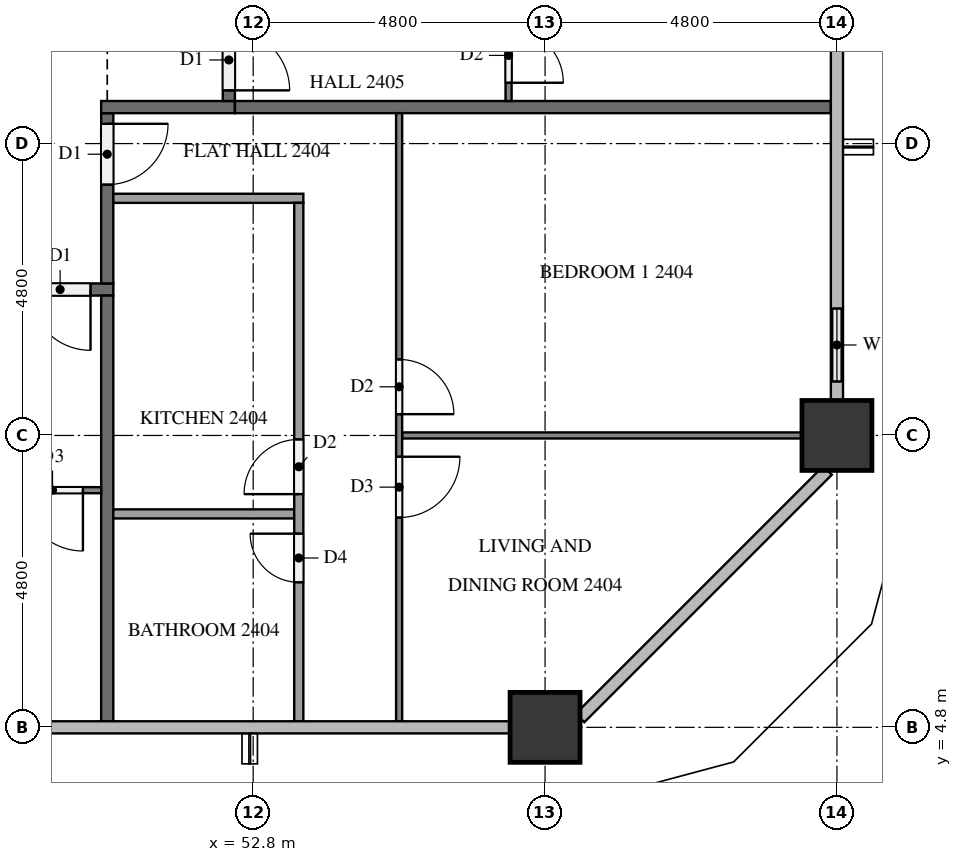
"""IFC4 building model, lengths in metres.
Left out: names, types, materials, properties, quantities, classifications, styles, units other than length and angle.
Written with IfcOpenShell. Run it as: python <this file> out.ifc"""

import sys

from ifc_helpers import new_model, si_unit, direction, frame, frame_2d, origin, origin_2d, place, context, subcontext, project, spatial, rectangle, extrude, element, fill, save


model = new_model("IFC4")
c1 = context("Model", 3, precision=1e-05, world=origin(), true_north=direction((0.0, 1.0)))
c2 = subcontext(c1, "Body", "Model", "MODEL_VIEW")
j1 = project(units=[si_unit("LENGTHUNIT", "METRE"), si_unit("PLANEANGLEUNIT", "RADIAN")], contexts=[c1])
p1 = place(None, origin())
s1 = spatial("IfcSite", under=j1, at=p1, CompositionType="ELEMENT")
p2 = place(p1, origin())
s2 = spatial("IfcBuilding", under=s1, at=p2, CompositionType="ELEMENT")
p3 = place(p2, frame((0.0, 0.0, 96.2)))
s3 = spatial("IfcBuildingStorey", under=s2, at=p3, CompositionType="ELEMENT", Elevation=96.2)
for number, where, z_axis, x_axis in (
    (1, (57.6, 4.8, 0.0), (0.0, 0.0, 1.0), (1.0, 0.0, 0.0)),
    (2, (62.4, 9.6, 0.0), (0.0, 0.0, 1.0), (1.0, 0.0, 0.0)),
):
    element("IfcColumn", number, at=place(p3, frame(where, z_axis=z_axis, x_axis=x_axis)), inside=s3, PredefinedType="COLUMN", context=c2, shape_type="SweptSolid", body=[
        extrude(rectangle(XDim=1.15, YDim=1.15, at=origin_2d()), origin(), (0.0, 0.0, 1.0), 3.2),
    ])
p4 = place(p3, frame((62.4, 10.175, 0.0), z_axis=(0.0, 0.0, 1.0), x_axis=(0.0, 1.0, 0.0)))
e3 = element("IfcWall", 3, at=p4, inside=s3, PredefinedType="SOLIDWALL", context=c2, shape_type="SweptSolid", body=[
    extrude(rectangle(XDim=1.825, YDim=0.15, at=frame_2d((0.913, 0.0))), origin(), (0.0, 0.0, 1.0), 3.2),
])
p5 = place(p4, frame((0.312, 0.0, 0.9)))
e4 = element("IfcOpeningElement", 4, at=p5, cuts=e3, PredefinedType="OPENING", context=c2, shape_type="SweptSolid", body=[
    extrude(rectangle(XDim=1.2, YDim=1.4, at=frame_2d((0.6, 0.7))), frame((0.0, 0.085, 0.0), z_axis=(0.0, -1.0, 0.0), x_axis=(1.0, 0.0, 0.0)), (0.0, 0.0, 1.0), 0.17),
])
p6 = place(p3, frame((50.5, 12.0, 0.0), z_axis=(0.0, 0.0, 1.0), x_axis=(-1.0, 0.0, 0.0)))
e5 = element("IfcWall", 5, at=p6, inside=s3, PredefinedType="PARTITIONING", context=c2, shape_type="SweptSolid", body=[
    extrude(rectangle(XDim=38.6, YDim=0.2, at=frame_2d((19.3, 0.0))), origin(), (0.0, 0.0, 1.0), 3.2),
])
p7 = place(p6, frame((21.975, 0.0, 0.0)))
e6 = element("IfcOpeningElement", 6, at=p7, cuts=e5, PredefinedType="OPENING", context=c2, shape_type="SweptSolid", body=[
    extrude(rectangle(XDim=1.0, YDim=2.1, at=frame_2d((0.5, 1.05))), frame((0.0, 0.11, 0.0), z_axis=(0.0, -1.0, 0.0), x_axis=(1.0, 0.0, 0.0)), (0.0, 0.0, 1.0), 0.22),
])
p8 = place(p6, frame((7.575, 0.0, 0.0)))
e7 = element("IfcOpeningElement", 7, at=p8, cuts=e5, PredefinedType="OPENING", context=c2, shape_type="SweptSolid", body=[
    extrude(rectangle(XDim=1.0, YDim=2.1, at=frame_2d((0.5, 1.05))), frame((0.0, 0.11, 0.0), z_axis=(0.0, -1.0, 0.0), x_axis=(1.0, 0.0, 0.0)), (0.0, 0.0, 1.0), 0.22),
])
p9 = place(p6, frame((0.375, 0.0, 0.0)))
e8 = element("IfcOpeningElement", 8, at=p9, cuts=e5, PredefinedType="OPENING", context=c2, shape_type="SweptSolid", body=[
    extrude(rectangle(XDim=1.0, YDim=2.1, at=frame_2d((0.5, 1.05))), frame((0.0, 0.11, 0.0), z_axis=(0.0, -1.0, 0.0), x_axis=(1.0, 0.0, 0.0)), (0.0, 0.0, 1.0), 0.22),
])
p10 = place(p3, frame((50.4, 14.9, 0.0), z_axis=(0.0, 0.0, 1.0), x_axis=(0.0, -1.0, 0.0)))
e9 = element("IfcWall", 9, at=p10, inside=s3, PredefinedType="PARTITIONING", context=c2, shape_type="SweptSolid", body=[
    extrude(rectangle(XDim=2.8, YDim=0.2, at=frame_2d((1.4, 0.0))), origin(), (0.0, 0.0, 1.0), 3.2),
])
p11 = place(p10, frame((0.175, 0.0, 0.0)))
e10 = element("IfcOpeningElement", 10, at=p11, cuts=e9, PredefinedType="OPENING", context=c2, shape_type="SweptSolid", body=[
    extrude(rectangle(XDim=1.0, YDim=2.1, at=frame_2d((0.5, 1.05))), frame((0.0, 0.11, 0.0), z_axis=(0.0, -1.0, 0.0), x_axis=(1.0, 0.0, 0.0)), (0.0, 0.0, 1.0), 0.22),
])
p12 = place(p3, frame((50.3, 15.0, 0.0), z_axis=(0.0, 0.0, 1.0), x_axis=(1.0, 0.0, 0.0)))
e11 = element("IfcWall", 11, at=p12, inside=s3, PredefinedType="PARTITIONING", context=c2, shape_type="SweptSolid", body=[
    extrude(rectangle(XDim=2.2, YDim=0.2, at=frame_2d((1.1, 0.0))), origin(), (0.0, 0.0, 1.0), 3.2),
])
p13 = place(p3, frame((52.4, 37.7, 0.0), z_axis=(0.0, 0.0, 1.0), x_axis=(0.0, -1.0, 0.0)))
e12 = element("IfcWall", 12, at=p13, inside=s3, PredefinedType="PARTITIONING", context=c2, shape_type="SweptSolid", body=[
    extrude(rectangle(XDim=22.6, YDim=0.2, at=frame_2d((11.3, 0.0))), origin(), (0.0, 0.0, 1.0), 3.2),
])
p14 = place(p13, frame((21.425, 0.0, 0.0)))
e13 = element("IfcOpeningElement", 13, at=p14, cuts=e12, PredefinedType="OPENING", context=c2, shape_type="SweptSolid", body=[
    extrude(rectangle(XDim=1.0, YDim=2.1, at=frame_2d((0.5, 1.05))), frame((0.0, 0.11, 0.0), z_axis=(0.0, -1.0, 0.0), x_axis=(1.0, 0.0, 0.0)), (0.0, 0.0, 1.0), 0.22),
])
p15 = place(p13, frame((0.175, 0.0, 0.0)))
e14 = element("IfcOpeningElement", 14, at=p15, cuts=e12, PredefinedType="OPENING", context=c2, shape_type="SweptSolid", body=[
    extrude(rectangle(XDim=1.0, YDim=2.1, at=frame_2d((0.5, 1.05))), frame((0.0, 0.11, 0.0), z_axis=(0.0, -1.0, 0.0), x_axis=(1.0, 0.0, 0.0)), (0.0, 0.0, 1.0), 0.22),
])
p16 = place(p3, frame((50.4, 11.9, 0.0), z_axis=(0.0, 0.0, 1.0), x_axis=(0.0, -1.0, 0.0)))
e15 = element("IfcWall", 15, at=p16, inside=s3, PredefinedType="PARTITIONING", context=c2, shape_type="SweptSolid", body=[
    extrude(rectangle(XDim=7.0, YDim=0.2, at=frame_2d((3.5, 0.0))), origin(), (0.0, 0.0, 1.0), 3.2),
])
p17 = place(p3, frame((52.5, 15.0, 0.0), z_axis=(0.0, 0.0, 1.0), x_axis=(1.0, 0.0, 0.0)))
e16 = element("IfcWall", 16, at=p17, inside=s3, PredefinedType="PARTITIONING", context=c2, shape_type="SweptSolid", body=[
    extrude(rectangle(XDim=9.8, YDim=0.2, at=frame_2d((4.9, 0.0))), origin(), (0.0, 0.0, 1.0), 3.2),
])
p18 = place(p3, frame((50.3, 8.7, 0.0), z_axis=(0.0, 0.0, 1.0), x_axis=(-1.0, 0.0, 0.0)))
e17 = element("IfcWall", 17, at=p18, inside=s3, PredefinedType="PARTITIONING", context=c2, shape_type="SweptSolid", body=[
    extrude(rectangle(XDim=7.0, YDim=0.1, at=frame_2d((3.5, 0.0))), origin(), (0.0, 0.0, 1.0), 3.2),
])
p19 = place(p18, frame((0.3, 0.0, 0.0)))
e18 = element("IfcOpeningElement", 18, at=p19, cuts=e17, PredefinedType="OPENING", context=c2, shape_type="SweptSolid", body=[
    extrude(rectangle(XDim=1.0, YDim=2.1, at=frame_2d((0.5, 1.05))), frame((0.0, 0.06, 0.0), z_axis=(0.0, -1.0, 0.0), x_axis=(1.0, 0.0, 0.0)), (0.0, 0.0, 1.0), 0.12),
])
p20 = place(p3, frame((55.25, 9.6, 0.0), z_axis=(0.0, 0.0, 1.0), x_axis=(1.0, 0.0, 0.0)))
e19 = element("IfcWall", 19, at=p20, inside=s3, PredefinedType="PARTITIONING", context=c2, shape_type="SweptSolid", body=[
    extrude(rectangle(XDim=6.575, YDim=0.1, at=frame_2d((3.288, 0.0))), origin(), (0.0, 0.0, 1.0), 3.2),
])
p21 = place(p3, frame((55.2, 14.9, 0.0), z_axis=(0.0, 0.0, 1.0), x_axis=(0.0, -1.0, 0.0)))
e20 = element("IfcWall", 20, at=p21, inside=s3, PredefinedType="PARTITIONING", context=c2, shape_type="SweptSolid", body=[
    extrude(rectangle(XDim=10.0, YDim=0.1, at=frame_2d((5.0, 0.0))), origin(), (0.0, 0.0, 1.0), 3.2),
])
p22 = place(p21, frame((4.05, 0.0, 0.0)))
e21 = element("IfcOpeningElement", 21, at=p22, cuts=e20, PredefinedType="OPENING", context=c2, shape_type="SweptSolid", body=[
    extrude(rectangle(XDim=0.9, YDim=2.1, at=frame_2d((0.45, 1.05))), frame((0.0, 0.06, 0.0), z_axis=(0.0, -1.0, 0.0), x_axis=(1.0, 0.0, 0.0)), (0.0, 0.0, 1.0), 0.12),
])
p23 = place(p21, frame((5.65, 0.0, 0.0)))
e22 = element("IfcOpeningElement", 22, at=p23, cuts=e20, PredefinedType="OPENING", context=c2, shape_type="SweptSolid", body=[
    extrude(rectangle(XDim=1.0, YDim=2.1, at=frame_2d((0.5, 1.05))), frame((0.0, 0.06, 0.0), z_axis=(0.0, -1.0, 0.0), x_axis=(1.0, 0.0, 0.0)), (0.0, 0.0, 1.0), 0.12),
])
p24 = place(p3, frame((50.5, 8.31, 0.0), z_axis=(0.0, 0.0, 1.0), x_axis=(1.0, 0.0, 0.0)))
e23 = element("IfcWall", 23, at=p24, inside=s3, PredefinedType="PARTITIONING", context=c2, shape_type="SweptSolid", body=[
    extrude(rectangle(XDim=2.975, YDim=0.15, at=frame_2d((1.488, 0.0))), origin(), (0.0, 0.0, 1.0), 3.2),
])
p25 = place(p3, frame((50.5, 13.5, 0.0), z_axis=(0.0, 0.0, 1.0), x_axis=(1.0, 0.0, 0.0)))
e24 = element("IfcWall", 24, at=p25, inside=s3, PredefinedType="PARTITIONING", context=c2, shape_type="SweptSolid", body=[
    extrude(rectangle(XDim=3.125, YDim=0.15, at=frame_2d((1.562, 0.0))), origin(), (0.0, 0.0, 1.0), 3.2),
])
p26 = place(p3, frame((53.55, 4.9, 0.0), z_axis=(0.0, 0.0, 1.0), x_axis=(0.0, 1.0, 0.0)))
e25 = element("IfcWall", 25, at=p26, inside=s3, PredefinedType="PARTITIONING", context=c2, shape_type="SweptSolid", body=[
    extrude(rectangle(XDim=8.525, YDim=0.15, at=frame_2d((4.263, 0.0))), origin(), (0.0, 0.0, 1.0), 3.2),
])
p27 = place(p26, frame((3.735, 0.0, 0.0)))
e26 = element("IfcOpeningElement", 26, at=p27, cuts=e25, PredefinedType="OPENING", context=c2, shape_type="SweptSolid", body=[
    extrude(rectangle(XDim=0.9, YDim=2.1, at=frame_2d((0.45, 1.05))), frame((0.0, 0.085, 0.0), z_axis=(0.0, -1.0, 0.0), x_axis=(1.0, 0.0, 0.0)), (0.0, 0.0, 1.0), 0.17),
])
p28 = place(p26, frame((2.285, 0.0, 0.0)))
e27 = element("IfcOpeningElement", 27, at=p28, cuts=e25, PredefinedType="OPENING", context=c2, shape_type="SweptSolid", body=[
    extrude(rectangle(XDim=0.8, YDim=2.1, at=frame_2d((0.4, 1.05))), frame((0.0, 0.085, 0.0), z_axis=(0.0, -1.0, 0.0), x_axis=(1.0, 0.0, 0.0)), (0.0, 0.0, 1.0), 0.17),
])
p29 = place(p3, frame((57.0, 28.7, 0.0), z_axis=(0.0, 0.0, 1.0), x_axis=(0.0, -1.0, 0.0)))
e28 = element("IfcWall", 28, at=p29, inside=s3, PredefinedType="PARTITIONING", context=c2, shape_type="SweptSolid", body=[
    extrude(rectangle(XDim=13.6, YDim=0.1, at=frame_2d((6.8, 0.0))), origin(), (0.0, 0.0, 1.0), 3.2),
])
p30 = place(p29, frame((12.4, 0.0, 0.0)))
e29 = element("IfcOpeningElement", 29, at=p30, cuts=e28, PredefinedType="OPENING", context=c2, shape_type="SweptSolid", body=[
    extrude(rectangle(XDim=0.9, YDim=2.1, at=frame_2d((0.45, 1.05))), frame((0.0, 0.06, 0.0), z_axis=(0.0, -1.0, 0.0), x_axis=(1.0, 0.0, 0.0)), (0.0, 0.0, 1.0), 0.12),
])
p31 = place(p29, frame((5.05, 0.0, 0.0)))
e30 = element("IfcOpeningElement", 30, at=p31, cuts=e28, PredefinedType="OPENING", context=c2, shape_type="SweptSolid", body=[
    extrude(rectangle(XDim=0.9, YDim=2.1, at=frame_2d((0.45, 1.05))), frame((0.0, 0.06, 0.0), z_axis=(0.0, -1.0, 0.0), x_axis=(1.0, 0.0, 0.0)), (0.0, 0.0, 1.0), 0.12),
])
p32 = place(p29, frame((3.35, 0.0, 0.0)))
e31 = element("IfcOpeningElement", 31, at=p32, cuts=e28, PredefinedType="OPENING", context=c2, shape_type="SweptSolid", body=[
    extrude(rectangle(XDim=1.0, YDim=2.1, at=frame_2d((0.5, 1.05))), frame((0.0, 0.06, 0.0), z_axis=(0.0, -1.0, 0.0), x_axis=(1.0, 0.0, 0.0)), (0.0, 0.0, 1.0), 0.12),
])
p33 = place(p5, origin())
e32 = element("IfcWindow", 32, at=p33, inside=s3, PartitioningType="SINGLE_PANEL", PredefinedType="WINDOW", context=c2, shape_type="SweptSolid", body=[
    extrude(rectangle(XDim=1.2, YDim=1.4, at=frame_2d((0.6, 0.7))), frame((0.0, 0.03, 0.0), z_axis=(0.0, -1.0, 0.0), x_axis=(1.0, 0.0, 0.0)), (0.0, 0.0, 1.0), 0.06),
])
fill(e4, e32)
p34 = place(p9, origin())
e33 = element("IfcDoor", 33, at=p34, inside=s3, OperationType="SINGLE_SWING_LEFT", PredefinedType="DOOR", context=c2, shape_type="SweptSolid", body=[
    extrude(rectangle(XDim=1.0, YDim=2.1, at=frame_2d((0.5, 1.05))), frame((0.0, 0.025, 0.0), z_axis=(0.0, -1.0, 0.0), x_axis=(1.0, 0.0, 0.0)), (0.0, 0.0, 1.0), 0.05),
])
fill(e8, e33)
p35 = place(p11, origin())
e34 = element("IfcDoor", 34, at=p35, inside=s3, OperationType="SINGLE_SWING_LEFT", PredefinedType="DOOR", context=c2, shape_type="SweptSolid", body=[
    extrude(rectangle(XDim=1.0, YDim=2.1, at=frame_2d((0.5, 1.05))), frame((0.0, 0.025, 0.0), z_axis=(0.0, -1.0, 0.0), x_axis=(1.0, 0.0, 0.0)), (0.0, 0.0, 1.0), 0.05),
])
fill(e10, e34)
p36 = place(p14, origin())
e35 = element("IfcDoor", 35, at=p36, inside=s3, OperationType="SINGLE_SWING_RIGHT", PredefinedType="DOOR", context=c2, shape_type="SweptSolid", body=[
    extrude(rectangle(XDim=1.0, YDim=2.1, at=frame_2d((0.5, 1.05))), frame((0.0, 0.025, 0.0), z_axis=(0.0, -1.0, 0.0), x_axis=(1.0, 0.0, 0.0)), (0.0, 0.0, 1.0), 0.05),
])
fill(e13, e35)
p37 = place(p19, origin())
e36 = element("IfcDoor", 36, at=p37, inside=s3, OperationType="SINGLE_SWING_LEFT", PredefinedType="DOOR", context=c2, shape_type="SweptSolid", body=[
    extrude(rectangle(XDim=1.0, YDim=2.1, at=frame_2d((0.5, 1.05))), frame((0.0, 0.025, 0.0), z_axis=(0.0, -1.0, 0.0), x_axis=(1.0, 0.0, 0.0)), (0.0, 0.0, 1.0), 0.05),
])
fill(e18, e36)
p38 = place(p22, origin())
e37 = element("IfcDoor", 37, at=p38, inside=s3, OperationType="SINGLE_SWING_RIGHT", PredefinedType="DOOR", context=c2, shape_type="SweptSolid", body=[
    extrude(rectangle(XDim=0.9, YDim=2.1, at=frame_2d((0.45, 1.05))), frame((0.0, 0.025, 0.0), z_axis=(0.0, -1.0, 0.0), x_axis=(1.0, 0.0, 0.0)), (0.0, 0.0, 1.0), 0.05),
])
fill(e21, e37)
p39 = place(p23, origin())
e38 = element("IfcDoor", 38, at=p39, inside=s3, OperationType="SINGLE_SWING_LEFT", PredefinedType="DOOR", context=c2, shape_type="SweptSolid", body=[
    extrude(rectangle(XDim=1.0, YDim=2.1, at=frame_2d((0.5, 1.05))), frame((0.0, 0.025, 0.0), z_axis=(0.0, -1.0, 0.0), x_axis=(1.0, 0.0, 0.0)), (0.0, 0.0, 1.0), 0.05),
])
fill(e22, e38)
p40 = place(p27, origin())
e39 = element("IfcDoor", 39, at=p40, inside=s3, OperationType="SINGLE_SWING_LEFT", PredefinedType="DOOR", context=c2, shape_type="SweptSolid", body=[
    extrude(rectangle(XDim=0.9, YDim=2.1, at=frame_2d((0.45, 1.05))), frame((0.0, 0.025, 0.0), z_axis=(0.0, -1.0, 0.0), x_axis=(1.0, 0.0, 0.0)), (0.0, 0.0, 1.0), 0.05),
])
fill(e26, e39)
p41 = place(p28, origin())
e40 = element("IfcDoor", 40, at=p41, inside=s3, OperationType="SINGLE_SWING_RIGHT", PredefinedType="DOOR", context=c2, shape_type="SweptSolid", body=[
    extrude(rectangle(XDim=0.8, YDim=2.1, at=frame_2d((0.4, 1.05))), frame((0.0, 0.025, 0.0), z_axis=(0.0, -1.0, 0.0), x_axis=(1.0, 0.0, 0.0)), (0.0, 0.0, 1.0), 0.05),
])
fill(e27, e40)
p42 = place(p30, origin())
e41 = element("IfcDoor", 41, at=p42, inside=s3, OperationType="SINGLE_SWING_RIGHT", PredefinedType="DOOR", context=c2, shape_type="SweptSolid", body=[
    extrude(rectangle(XDim=0.9, YDim=2.1, at=frame_2d((0.45, 1.05))), frame((0.0, 0.025, 0.0), z_axis=(0.0, -1.0, 0.0), x_axis=(1.0, 0.0, 0.0)), (0.0, 0.0, 1.0), 0.05),
])
fill(e29, e41)
save(model, sys.argv[1])
